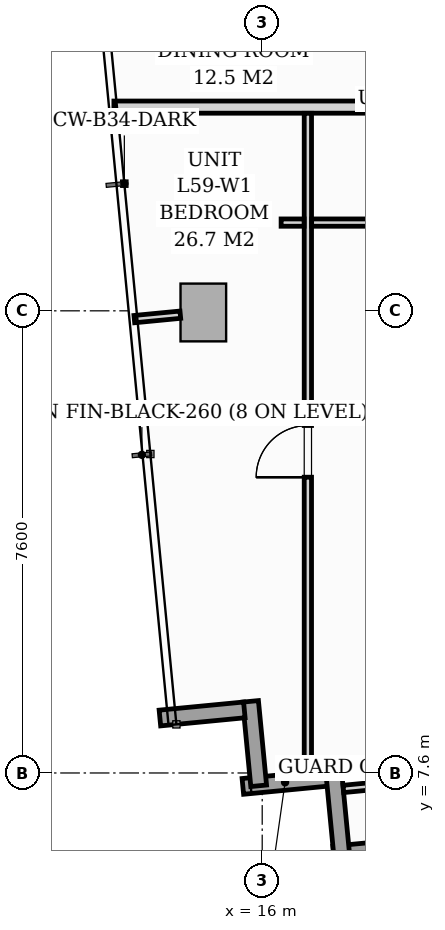
"""IFC4 building model, lengths in metres.
Left out: names, types, materials, properties, quantities, classifications, styles, units other than length and angle.
Written with IfcOpenShell. Run it as: python <this file> out.ifc"""

import sys

from ifc_helpers import new_model, si_unit, direction, frame, frame_2d, origin, origin_2d, place, context, subcontext, project, spatial, rectangle, extrude, source, transform, mapped, element, fill, save


model = new_model("IFC4")
c1 = context("Model", 3, precision=1e-05, world=origin(), true_north=direction((0.0, 1.0)))
c2 = subcontext(c1, "Body", "Model", "MODEL_VIEW")
j1 = project(units=[si_unit("LENGTHUNIT", "METRE"), si_unit("PLANEANGLEUNIT", "RADIAN")], contexts=[c1])
p1 = place(None, origin())
s1 = spatial("IfcSite", under=j1, at=p1, CompositionType="ELEMENT")
p2 = place(p1, origin())
s2 = spatial("IfcBuilding", under=s1, at=p2, CompositionType="ELEMENT")
p3 = place(p2, frame((0.0, 0.0, 205.0)))
s3 = spatial("IfcBuildingStorey", under=s2, at=p3, CompositionType="ELEMENT", Elevation=205.0)
m1 = source(origin(), c2, "Body", "SweptSolid", [
    extrude(rectangle(XDim=0.75, YDim=0.95, at=origin_2d()), origin(), (0.0, 0.0, 1.0), 3.196),
])
p4 = place(p3, frame((15.032, 15.173, 0.002), z_axis=(0.0, 0.0, 1.0), x_axis=(0.995396198367, 0.09584575252, 0.0)))
e1 = element("IfcColumn", 1, at=p4, inside=s3, PredefinedType="COLUMN", context=c2, shape_type="MappedRepresentation", body=[
    mapped(m1, transform((0.0, 0.0, 0.0), scale=1.0)),
])
p5 = place(p3, frame((17.07, 7.513, 0.0), z_axis=(0.0, 0.0, 1.0), x_axis=(-0.995391056452, -0.09589913835, 0.0)))
e2 = element("IfcWall", 2, at=p5, inside=s3, PredefinedType="STANDARD", context=c2, shape_type="SweptSolid", body=[
    extrude(rectangle(XDim=1.395, YDim=0.26, at=frame_2d((0.698, 0.0))), origin(), (0.0, 0.0, 1.0), 2.94),
])
p6 = place(p3, frame((15.942, 7.389, 0.0), z_axis=(0.0, 0.0, 1.0), x_axis=(-0.095742423056, 0.99540614245, 0.0)))
e3 = element("IfcWall", 3, at=p6, inside=s3, PredefinedType="STANDARD", context=c2, shape_type="SweptSolid", body=[
    extrude(rectangle(XDim=1.395, YDim=0.26, at=frame_2d((0.697, 0.0))), origin(), (0.0, 0.0, 1.0), 2.94),
])
p7 = place(p3, frame((15.706, 8.637, 0.0), z_axis=(0.0, 0.0, 1.0), x_axis=(-0.995391056452, -0.09589913835, 0.0)))
e4 = element("IfcWall", 4, at=p7, inside=s3, PredefinedType="STANDARD", context=c2, shape_type="SweptSolid", body=[
    extrude(rectangle(XDim=1.395, YDim=0.26, at=frame_2d((0.698, 0.0))), origin(), (0.0, 0.0, 1.0), 2.94),
])
p8 = place(p3, frame((33.201, 7.81, 0.0), z_axis=(0.0, 0.0, 1.0), x_axis=(-0.995397074604, -0.095836652014, 0.0)))
e5 = element("IfcWall", 5, at=p8, inside=s3, PredefinedType="STANDARD", context=c2, shape_type="SweptSolid", body=[
    extrude(rectangle(XDim=16.1, YDim=0.26, at=frame_2d((8.05, 0.0))), origin(), (0.0, 0.0, 1.0), 2.94),
])
p9 = place(p8, frame((6.37, 0.0, 0.0)))
e6 = element("IfcOpeningElement", 6, at=p9, cuts=e5, PredefinedType="OPENING", context=c2, shape_type="SweptSolid", body=[
    extrude(rectangle(XDim=1.8, YDim=2.06, at=frame_2d((0.9, 1.03))), frame((0.0, 0.14, 0.0), z_axis=(0.0, -1.0, 0.0), x_axis=(1.0, 0.0, 0.0)), (0.0, 0.0, 1.0), 0.28),
])
p10 = place(p8, frame((1.6, 0.0, 0.65)))
e7 = element("IfcOpeningElement", 7, at=p10, cuts=e5, PredefinedType="OPENING", context=c2, shape_type="SweptSolid", body=[
    extrude(rectangle(XDim=1.6, YDim=1.5, at=frame_2d((0.8, 0.75))), frame((0.0, 0.14, 0.0), z_axis=(0.0, -1.0, 0.0), x_axis=(1.0, 0.0, 0.0)), (0.0, 0.0, 1.0), 0.28),
])
p11 = place(p3, frame((17.306, 6.265, 0.0), z_axis=(0.0, 0.0, 1.0), x_axis=(-0.095915846097, 0.995389446633, 0.0)))
e8 = element("IfcWall", 8, at=p11, inside=s3, PredefinedType="STANDARD", context=c2, shape_type="SweptSolid", body=[
    extrude(rectangle(XDim=1.395, YDim=0.26, at=frame_2d((0.697, 0.0))), origin(), (0.0, 0.0, 1.0), 2.94),
])
p12 = place(p3, frame((13.561, 18.55, 0.0), z_axis=(0.0, 0.0, 1.0), x_axis=(1.0, 0.0, 0.0)))
e9 = element("IfcWall", 9, at=p12, inside=s3, PredefinedType="PARTITIONING", context=c2, shape_type="SweptSolid", body=[
    extrude(rectangle(XDim=10.907, YDim=0.2, at=frame_2d((5.453, 0.0))), origin(), (0.0, 0.0, 1.0), 2.94),
])
p13 = place(p3, frame((16.751, 7.615, 0.0), z_axis=(0.0, 0.0, 1.0), x_axis=(0.0, 1.0, 0.0)))
e10 = element("IfcWall", 10, at=p13, inside=s3, PredefinedType="PARTITIONING", context=c2, shape_type="SweptSolid", body=[
    extrude(rectangle(XDim=10.833, YDim=0.12, at=frame_2d((5.417, 0.0))), origin(), (0.0, 0.0, 1.0), 2.94),
])
p14 = place(p13, frame((4.849, 0.0, 0.0)))
e11 = element("IfcOpeningElement", 11, at=p14, cuts=e10, PredefinedType="OPENING", context=c2, shape_type="SweptSolid", body=[
    extrude(rectangle(XDim=0.85, YDim=2.05, at=frame_2d((0.425, 1.025))), frame((0.0, 0.07, 0.0), z_axis=(0.0, -1.0, 0.0), x_axis=(1.0, 0.0, 0.0)), (0.0, 0.0, 1.0), 0.14),
])
p15 = place(p3, frame((16.311, 16.651, 0.0), z_axis=(0.0, 0.0, 1.0), x_axis=(1.0, 0.0, 0.0)))
e12 = element("IfcWall", 12, at=p15, inside=s3, PredefinedType="PARTITIONING", context=c2, shape_type="SweptSolid", body=[
    extrude(rectangle(XDim=0.378, YDim=0.12, at=frame_2d((0.189, 0.0))), origin(), (0.0, 0.0, 1.0), 2.94),
])
p16 = place(p3, frame((16.813, 16.651, 0.0), z_axis=(0.0, 0.0, 1.0), x_axis=(1.0, 0.0, 0.0)))
e13 = element("IfcWall", 13, at=p16, inside=s3, PredefinedType="PARTITIONING", context=c2, shape_type="SweptSolid", body=[
    extrude(rectangle(XDim=7.655, YDim=0.12, at=frame_2d((3.828, 0.0))), origin(), (0.0, 0.0, 1.0), 2.281),
])
p17 = place(p16, frame((3.403, 0.0, 0.0)))
e14 = element("IfcOpeningElement", 14, at=p17, cuts=e13, PredefinedType="OPENING", context=c2, shape_type="SweptSolid", body=[
    extrude(rectangle(XDim=0.85, YDim=2.05, at=frame_2d((0.425, 1.025))), frame((0.0, 0.07, 0.0), z_axis=(0.0, -1.0, 0.0), x_axis=(1.0, 0.0, 0.0)), (0.0, 0.0, 1.0), 0.14),
])
p18 = place(p3, frame((17.791, 7.382, 0.0), z_axis=(0.0, 0.0, 1.0), x_axis=(-0.995384576284, -0.09596637586, 0.0)))
e15 = element("IfcWall", 15, at=p18, inside=s3, PredefinedType="PARTITIONING", context=c2, shape_type="SweptSolid", body=[
    extrude(rectangle(XDim=0.458, YDim=0.12, at=frame_2d((0.229, 0.0))), origin(), (0.0, 0.0, 1.0), 2.94),
])
p19 = place(p3, frame((14.654, 15.136, 0.0), z_axis=(0.0, 0.0, 1.0), x_axis=(-0.995408440582, -0.095718527039, 0.0)))
e16 = element("IfcWall", 16, at=p19, inside=s3, PredefinedType="PARTITIONING", context=c2, shape_type="SweptSolid", body=[
    extrude(rectangle(XDim=0.76, YDim=0.12, at=frame_2d((0.38, 0.0))), origin(), (0.0, 0.0, 1.0), 2.94),
])
m2 = source(origin(), c2, "Body", "SweptSolid", [
    extrude(rectangle(XDim=0.85, YDim=2.05, at=frame_2d((0.425, 1.025))), frame((0.0, 0.025, 0.0), z_axis=(0.0, -1.0, 0.0), x_axis=(1.0, 0.0, 0.0)), (0.0, 0.0, 1.0), 0.05),
])
p20 = place(p14, origin())
e17 = element("IfcDoor", 17, at=p20, inside=s3, OperationType="SINGLE_SWING_LEFT", PredefinedType="DOOR", context=c2, shape_type="MappedRepresentation", body=[
    mapped(m2, transform((0.0, 0.0, 0.0), scale=1.0)),
])
fill(e11, e17)
save(model, sys.argv[1])
